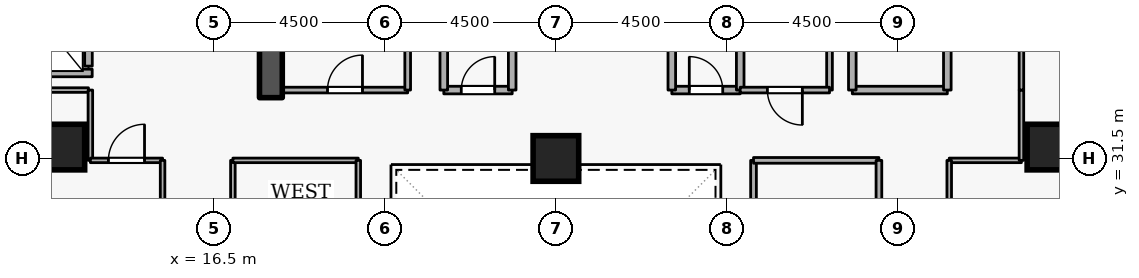
"""IFC4 building model, lengths in metres.
Left out: names, types, materials, properties, quantities, classifications, styles, units other than length and angle.
Written with IfcOpenShell. Run it as: python <this file> out.ifc"""

import sys

from ifc_helpers import new_model, si_unit, direction, frame, frame_2d, origin, origin_2d, place, context, subcontext, project, spatial, rectangle, extrude, element, fill, save


model = new_model("IFC4")
c1 = context("Model", 3, precision=1e-05, world=origin(), true_north=direction((0.0, 1.0)))
c2 = subcontext(c1, "Body", "Model", "MODEL_VIEW")
j1 = project(units=[si_unit("LENGTHUNIT", "METRE"), si_unit("PLANEANGLEUNIT", "RADIAN")], contexts=[c1])
p1 = place(None, origin())
s1 = spatial("IfcSite", under=j1, at=p1, CompositionType="ELEMENT")
p2 = place(p1, origin())
s2 = spatial("IfcBuilding", under=s1, at=p2, CompositionType="ELEMENT")
p3 = place(p2, frame((0.0, 0.0, 87.3)))
s3 = spatial("IfcBuildingStorey", under=s2, at=p3, CompositionType="ELEMENT", Elevation=87.3)
p4 = place(p3, frame((18.0, 33.1, 0.0), z_axis=(0.0, 0.0, 1.0), x_axis=(0.0, 1.0, 0.0)))
e1 = element("IfcWall", 1, at=p4, inside=s3, PredefinedType="SHEAR", context=c2, shape_type="SweptSolid", body=[
    extrude(rectangle(XDim=5.7, YDim=0.6, at=frame_2d((2.85, 0.0))), origin(), (0.0, 0.0, 1.0), 3.6),
])
for number, where, z_axis, x_axis in (
    (2, (12.5, 31.8, 0.0), (0.0, 0.0, 1.0), (1.0, 0.0, 0.0)),
    (3, (38.5, 31.8, 0.0), (0.0, 0.0, 1.0), (1.0, 0.0, 0.0)),
    (4, (25.5, 31.5, 0.0), (0.0, 0.0, 1.0), (1.0, 0.0, 0.0)),
):
    element("IfcColumn", number, at=place(p3, frame(where, z_axis=z_axis, x_axis=x_axis)), inside=s3, PredefinedType="COLUMN", context=c2, shape_type="SweptSolid", body=[
        extrude(rectangle(XDim=1.2, YDim=1.2, at=origin_2d()), origin(), (0.0, 0.0, 1.0), 3.6),
    ])
p5 = place(p3, frame((13.2, 33.93, 0.0), z_axis=(0.0, 0.0, 1.0), x_axis=(0.0, 1.0, 0.0)))
e5 = element("IfcWall", 5, at=p5, inside=s3, PredefinedType="STANDARD", context=c2, shape_type="SweptSolid", body=[
    extrude(rectangle(XDim=1.94, YDim=0.2, at=frame_2d((0.97, 0.0))), origin(), (0.0, 0.0, 1.0), 3.34),
])
p6 = place(p5, frame((0.46, 0.0, 0.0)))
e6 = element("IfcOpeningElement", 6, at=p6, cuts=e5, PredefinedType="OPENING", context=c2, shape_type="SweptSolid", body=[
    extrude(rectangle(XDim=1.02, YDim=2.06, at=frame_2d((0.51, 1.03))), frame((0.0, 0.11, 0.0), z_axis=(0.0, -1.0, 0.0), x_axis=(1.0, 0.0, 0.0)), (0.0, 0.0, 1.0), 0.22),
])
p7 = place(p3, frame((11.002, 33.75, 0.0), z_axis=(0.0, 0.0, 1.0), x_axis=(1.0, 0.0, 0.0)))
e7 = element("IfcWall", 7, at=p7, inside=s3, PredefinedType="STANDARD", context=c2, shape_type="SweptSolid", body=[
    extrude(rectangle(XDim=2.296, YDim=0.2, at=frame_2d((1.148, 0.0))), origin(), (0.0, 0.0, 1.0), 3.34),
])
p8 = place(p3, frame((33.3, 33.3, 0.0), z_axis=(0.0, 0.0, 1.0), x_axis=(1.0, 0.0, 0.0)))
e8 = element("IfcWall", 8, at=p8, inside=s3, PredefinedType="STANDARD", context=c2, shape_type="SweptSolid", body=[
    extrude(rectangle(XDim=2.5, YDim=0.2, at=frame_2d((1.25, 0.0))), origin(), (0.0, 0.0, 1.0), 3.34),
])
p9 = place(p3, frame((35.8, 33.3, 0.0), z_axis=(0.0, 0.0, 1.0), x_axis=(0.0, 1.0, 0.0)))
e9 = element("IfcWall", 9, at=p9, inside=s3, PredefinedType="STANDARD", context=c2, shape_type="SweptSolid", body=[
    extrude(rectangle(XDim=5.7, YDim=0.2, at=frame_2d((2.85, 0.0))), origin(), (0.0, 0.0, 1.0), 3.34),
])
p10 = place(p9, frame((2.275, 0.0, 0.0)))
e10 = element("IfcOpeningElement", 10, at=p10, cuts=e9, PredefinedType="OPENING", context=c2, shape_type="SweptSolid", body=[
    extrude(rectangle(XDim=1.15, YDim=2.1, at=frame_2d((0.575, 1.05))), frame((0.0, 0.11, 0.0), z_axis=(0.0, -1.0, 0.0), x_axis=(1.0, 0.0, 0.0)), (0.0, 0.0, 1.0), 0.22),
])
p11 = place(p3, frame((33.3, 35.6, 0.0), z_axis=(0.0, 0.0, 1.0), x_axis=(0.0, -1.0, 0.0)))
e11 = element("IfcWall", 11, at=p11, inside=s3, PredefinedType="STANDARD", context=c2, shape_type="SweptSolid", body=[
    extrude(rectangle(XDim=2.3, YDim=0.2, at=frame_2d((1.15, 0.0))), origin(), (0.0, 0.0, 1.0), 2.545),
])
p12 = place(p3, frame((22.55, 33.3, 0.0), z_axis=(0.0, 0.0, 1.0), x_axis=(1.0, 0.0, 0.0)))
e12 = element("IfcWall", 12, at=p12, inside=s3, PredefinedType="STANDARD", context=c2, shape_type="SweptSolid", body=[
    extrude(rectangle(XDim=1.8, YDim=0.2, at=frame_2d((0.9, 0.0))), origin(), (0.0, 0.0, 1.0), 3.34),
])
p13 = place(p12, frame((0.46, 0.0, 0.0)))
e13 = element("IfcOpeningElement", 13, at=p13, cuts=e12, PredefinedType="OPENING", context=c2, shape_type="SweptSolid", body=[
    extrude(rectangle(XDim=0.88, YDim=2.04, at=frame_2d((0.44, 1.02))), frame((0.0, 0.11, 0.0), z_axis=(0.0, -1.0, 0.0), x_axis=(1.0, 0.0, 0.0)), (0.0, 0.0, 1.0), 0.22),
])
for number, where, z_axis, x_axis in (
    (14, (24.35, 33.3, 0.0), (0.0, 0.0, 1.0), (0.0, 1.0, 0.0)),
    (15, (22.55, 35.35, 0.0), (0.0, 0.0, 1.0), (0.0, -1.0, 0.0)),
):
    element("IfcWall", number, at=place(p3, frame(where, z_axis=z_axis, x_axis=x_axis)), inside=s3, PredefinedType="STANDARD", context=c2, shape_type="SweptSolid", body=[
        extrude(rectangle(XDim=2.05, YDim=0.2, at=frame_2d((1.025, 0.0))), origin(), (0.0, 0.0, 1.0), 3.34),
    ])
p14 = place(p3, frame((28.55, 33.3, 0.0), z_axis=(0.0, 0.0, 1.0), x_axis=(1.0, 0.0, 0.0)))
e16 = element("IfcWall", 16, at=p14, inside=s3, PredefinedType="STANDARD", context=c2, shape_type="SweptSolid", body=[
    extrude(rectangle(XDim=1.8, YDim=0.2, at=frame_2d((0.9, 0.0))), origin(), (0.0, 0.0, 1.0), 3.34),
])
p15 = place(p14, frame((0.46, 0.0, 0.0)))
e17 = element("IfcOpeningElement", 17, at=p15, cuts=e16, PredefinedType="OPENING", context=c2, shape_type="SweptSolid", body=[
    extrude(rectangle(XDim=0.88, YDim=2.04, at=frame_2d((0.44, 1.02))), frame((0.0, 0.11, 0.0), z_axis=(0.0, -1.0, 0.0), x_axis=(1.0, 0.0, 0.0)), (0.0, 0.0, 1.0), 0.22),
])
for number, where, z_axis, x_axis in (
    (18, (30.35, 33.3, 0.0), (0.0, 0.0, 1.0), (0.0, 1.0, 0.0)),
    (19, (28.55, 35.35, 0.0), (0.0, 0.0, 1.0), (0.0, -1.0, 0.0)),
):
    element("IfcWall", number, at=place(p3, frame(where, z_axis=z_axis, x_axis=x_axis)), inside=s3, PredefinedType="STANDARD", context=c2, shape_type="SweptSolid", body=[
        extrude(rectangle(XDim=2.05, YDim=0.2, at=frame_2d((1.025, 0.0))), origin(), (0.0, 0.0, 1.0), 3.34),
    ])
p16 = place(p3, frame((18.3, 33.3, 0.0), z_axis=(0.0, 0.0, 1.0), x_axis=(1.0, 0.0, 0.0)))
e20 = element("IfcWall", 20, at=p16, inside=s3, PredefinedType="PARTITIONING", context=c2, shape_type="SweptSolid", body=[
    extrude(rectangle(XDim=3.3, YDim=0.15, at=frame_2d((1.65, 0.0))), origin(), (0.0, 0.0, 1.0), 3.34),
])
p17 = place(p16, frame((1.19, 0.0, 0.0)))
e21 = element("IfcOpeningElement", 21, at=p17, cuts=e20, PredefinedType="OPENING", context=c2, shape_type="SweptSolid", body=[
    extrude(rectangle(XDim=0.92, YDim=2.08, at=frame_2d((0.46, 1.04))), frame((0.0, 0.085, 0.0), z_axis=(0.0, -1.0, 0.0), x_axis=(1.0, 0.0, 0.0)), (0.0, 0.0, 1.0), 0.17),
])
p18 = place(p3, frame((21.6, 33.3, 0.0), z_axis=(0.0, 0.0, 1.0), x_axis=(0.0, 1.0, 0.0)))
e22 = element("IfcWall", 22, at=p18, inside=s3, PredefinedType="PARTITIONING", context=c2, shape_type="SweptSolid", body=[
    extrude(rectangle(XDim=2.05, YDim=0.15, at=frame_2d((1.025, 0.0))), origin(), (0.0, 0.0, 1.0), 3.34),
])
p19 = place(p3, frame((32.7, 35.35, 0.0), z_axis=(0.0, 0.0, 1.0), x_axis=(0.0, -1.0, 0.0)))
e23 = element("IfcWall", 23, at=p19, inside=s3, PredefinedType="PARTITIONING", context=c2, shape_type="SweptSolid", body=[
    extrude(rectangle(XDim=2.05, YDim=0.15, at=frame_2d((1.025, 0.0))), origin(), (0.0, 0.0, 1.0), 2.545),
])
p20 = place(p3, frame((32.7, 33.3, 0.0), z_axis=(0.0, 0.0, 1.0), x_axis=(-1.0, 0.0, 0.0)))
e24 = element("IfcWall", 24, at=p20, inside=s3, PredefinedType="PARTITIONING", context=c2, shape_type="SweptSolid", body=[
    extrude(rectangle(XDim=2.35, YDim=0.15, at=frame_2d((1.175, 0.0))), origin(), (0.0, 0.0, 1.0), 3.34),
])
p21 = place(p20, frame((0.715, 0.0, 0.0)))
e25 = element("IfcOpeningElement", 25, at=p21, cuts=e24, PredefinedType="OPENING", context=c2, shape_type="SweptSolid", body=[
    extrude(rectangle(XDim=0.92, YDim=2.08, at=frame_2d((0.46, 1.04))), frame((0.0, 0.085, 0.0), z_axis=(0.0, -1.0, 0.0), x_axis=(1.0, 0.0, 0.0)), (0.0, 0.0, 1.0), 0.17),
])
p22 = place(p3, frame((10.9, 33.3, 0.0), z_axis=(0.0, 0.0, 1.0), x_axis=(1.0, 0.0, 0.0)))
e26 = element("IfcWall", 26, at=p22, inside=s3, PredefinedType="PARTITIONING", context=c2, shape_type="SweptSolid", body=[
    extrude(rectangle(XDim=2.3, YDim=0.12, at=frame_2d((1.15, 0.0))), origin(), (0.0, 0.0, 1.0), 3.34),
])
p23 = place(p3, frame((13.25, 33.3, 0.0), z_axis=(0.0, 0.0, 1.0), x_axis=(0.0, -1.0, 0.0)))
e27 = element("IfcWall", 27, at=p23, inside=s3, PredefinedType="PARTITIONING", context=c2, shape_type="SweptSolid", body=[
    extrude(rectangle(XDim=1.85, YDim=0.12, at=frame_2d((0.925, 0.0))), origin(), (0.0, 0.0, 1.0), 3.34),
])
p24 = place(p3, frame((13.25, 31.45, 0.0), z_axis=(0.0, 0.0, 1.0), x_axis=(1.0, 0.0, 0.0)))
e28 = element("IfcWall", 28, at=p24, inside=s3, PredefinedType="PARTITIONING", context=c2, shape_type="SweptSolid", body=[
    extrude(rectangle(XDim=1.9, YDim=0.12, at=frame_2d((0.95, 0.0))), origin(), (0.0, 0.0, 1.0), 3.34),
])
p25 = place(p24, frame((0.475, 0.0, 0.0)))
e29 = element("IfcOpeningElement", 29, at=p25, cuts=e28, PredefinedType="OPENING", context=c2, shape_type="SweptSolid", body=[
    extrude(rectangle(XDim=0.95, YDim=2.1, at=frame_2d((0.475, 1.05))), frame((0.0, 0.07, 0.0), z_axis=(0.0, -1.0, 0.0), x_axis=(1.0, 0.0, 0.0)), (0.0, 0.0, 1.0), 0.14),
])
p26 = place(p3, frame((15.15, 31.45, 0.0), z_axis=(0.0, 0.0, 1.0), x_axis=(0.0, -1.0, 0.0)))
e30 = element("IfcWall", 30, at=p26, inside=s3, PredefinedType="PARTITIONING", context=c2, shape_type="SweptSolid", body=[
    extrude(rectangle(XDim=1.3, YDim=0.12, at=frame_2d((0.65, 0.0))), origin(), (0.0, 0.0, 1.0), 3.34),
])
p27 = place(p3, frame((35.85, 31.45, 0.0), z_axis=(0.0, 0.0, 1.0), x_axis=(1.0, 0.0, 0.0)))
e31 = element("IfcWall", 31, at=p27, inside=s3, PredefinedType="PARTITIONING", context=c2, shape_type="SweptSolid", body=[
    extrude(rectangle(XDim=1.9, YDim=0.12, at=frame_2d((0.95, 0.0))), origin(), (0.0, 0.0, 1.0), 3.34),
])
p28 = place(p3, frame((37.75, 31.45, 0.0), z_axis=(0.0, 0.0, 1.0), x_axis=(0.0, 1.0, 0.0)))
e32 = element("IfcWall", 32, at=p28, inside=s3, PredefinedType="PARTITIONING", context=c2, shape_type="SweptSolid", body=[
    extrude(rectangle(XDim=1.85, YDim=0.12, at=frame_2d((0.925, 0.0))), origin(), (0.0, 0.0, 1.0), 3.34),
])
p29 = place(p3, frame((37.75, 33.3, 0.0), z_axis=(0.0, 0.0, 1.0), x_axis=(0.0, 1.0, 0.0)))
e33 = element("IfcWall", 33, at=p29, inside=s3, PredefinedType="PARTITIONING", context=c2, shape_type="SweptSolid", body=[
    extrude(rectangle(XDim=9.35, YDim=0.12, at=frame_2d((4.675, 0.0))), origin(), (0.0, 0.0, 1.0), 3.34),
])
p30 = place(p29, frame((4.15, 0.0, 0.0)))
e34 = element("IfcOpeningElement", 34, at=p30, cuts=e33, PredefinedType="OPENING", context=c2, shape_type="SweptSolid", body=[
    extrude(rectangle(XDim=1.05, YDim=2.1, at=frame_2d((0.525, 1.05))), frame((0.0, 0.07, 0.0), z_axis=(0.0, -1.0, 0.0), x_axis=(1.0, 0.0, 0.0)), (0.0, 0.0, 1.0), 0.14),
])
p31 = place(p3, frame((35.85, 30.15, 0.0), z_axis=(0.0, 0.0, 1.0), x_axis=(0.0, 1.0, 0.0)))
e35 = element("IfcWall", 35, at=p31, inside=s3, PredefinedType="PARTITIONING", context=c2, shape_type="SweptSolid", body=[
    extrude(rectangle(XDim=1.3, YDim=0.12, at=frame_2d((0.65, 0.0))), origin(), (0.0, 0.0, 1.0), 3.34),
])
p32 = place(p3, frame((30.7, 22.55, 0.0), z_axis=(0.0, 0.0, 1.0), x_axis=(0.0, 1.0, 0.0)))
e36 = element("IfcWall", 36, at=p32, inside=s3, PredefinedType="PARTITIONING", context=c2, shape_type="SweptSolid", body=[
    extrude(rectangle(XDim=8.9, YDim=0.15, at=frame_2d((4.45, 0.0))), origin(), (0.0, 0.0, 1.0), 3.34),
])
p33 = place(p3, frame((30.7, 31.45, 0.0), z_axis=(0.0, 0.0, 1.0), x_axis=(1.0, 0.0, 0.0)))
e37 = element("IfcWall", 37, at=p33, inside=s3, PredefinedType="PARTITIONING", context=c2, shape_type="SweptSolid", body=[
    extrude(rectangle(XDim=3.3, YDim=0.15, at=frame_2d((1.65, 0.0))), origin(), (0.0, 0.0, 1.0), 3.34),
])
p34 = place(p3, frame((34.0, 31.45, 0.0), z_axis=(0.0, 0.0, 1.0), x_axis=(0.0, -1.0, 0.0)))
e38 = element("IfcWall", 38, at=p34, inside=s3, PredefinedType="PARTITIONING", context=c2, shape_type="SweptSolid", body=[
    extrude(rectangle(XDim=8.9, YDim=0.15, at=frame_2d((4.45, 0.0))), origin(), (0.0, 0.0, 1.0), 3.34),
])
p35 = place(p34, frame((3.8, 0.0, 0.0)))
e39 = element("IfcOpeningElement", 39, at=p35, cuts=e38, PredefinedType="OPENING", context=c2, shape_type="SweptSolid", body=[
    extrude(rectangle(XDim=1.3, YDim=2.12, at=frame_2d((0.65, 1.06))), frame((0.0, 0.085, 0.0), z_axis=(0.0, -1.0, 0.0), x_axis=(1.0, 0.0, 0.0)), (0.0, 0.0, 1.0), 0.17),
])
p36 = place(p3, frame((17.0, 22.55, 0.0), z_axis=(0.0, 0.0, 1.0), x_axis=(0.0, 1.0, 0.0)))
e40 = element("IfcWall", 40, at=p36, inside=s3, PredefinedType="PARTITIONING", context=c2, shape_type="SweptSolid", body=[
    extrude(rectangle(XDim=8.9, YDim=0.12, at=frame_2d((4.45, 0.0))), origin(), (0.0, 0.0, 1.0), 3.34),
])
p37 = place(p36, frame((3.975, 0.0, 0.0)))
e41 = element("IfcOpeningElement", 41, at=p37, cuts=e40, PredefinedType="OPENING", context=c2, shape_type="SweptSolid", body=[
    extrude(rectangle(XDim=0.95, YDim=2.1, at=frame_2d((0.475, 1.05))), frame((0.0, 0.07, 0.0), z_axis=(0.0, -1.0, 0.0), x_axis=(1.0, 0.0, 0.0)), (0.0, 0.0, 1.0), 0.14),
])
p38 = place(p3, frame((17.0, 31.45, 0.0), z_axis=(0.0, 0.0, 1.0), x_axis=(1.0, 0.0, 0.0)))
e42 = element("IfcWall", 42, at=p38, inside=s3, PredefinedType="PARTITIONING", context=c2, shape_type="SweptSolid", body=[
    extrude(rectangle(XDim=3.3, YDim=0.12, at=frame_2d((1.65, 0.0))), origin(), (0.0, 0.0, 1.0), 3.34),
])
p39 = place(p3, frame((20.3, 31.45, 0.0), z_axis=(0.0, 0.0, 1.0), x_axis=(0.0, -1.0, 0.0)))
e43 = element("IfcWall", 43, at=p39, inside=s3, PredefinedType="PARTITIONING", context=c2, shape_type="SweptSolid", body=[
    extrude(rectangle(XDim=8.9, YDim=0.12, at=frame_2d((4.45, 0.0))), origin(), (0.0, 0.0, 1.0), 3.34),
])
p40 = place(p13, origin())
e44 = element("IfcDoor", 44, at=p40, inside=s3, OperationType="SINGLE_SWING_RIGHT", PredefinedType="DOOR", context=c2, shape_type="SweptSolid", body=[
    extrude(rectangle(XDim=0.88, YDim=2.04, at=frame_2d((0.44, 1.02))), frame((0.0, 0.025, 0.0), z_axis=(0.0, -1.0, 0.0), x_axis=(1.0, 0.0, 0.0)), (0.0, 0.0, 1.0), 0.05),
])
fill(e13, e44)
p41 = place(p15, origin())
e45 = element("IfcDoor", 45, at=p41, inside=s3, OperationType="SINGLE_SWING_LEFT", PredefinedType="DOOR", context=c2, shape_type="SweptSolid", body=[
    extrude(rectangle(XDim=0.88, YDim=2.04, at=frame_2d((0.44, 1.02))), frame((0.0, 0.025, 0.0), z_axis=(0.0, -1.0, 0.0), x_axis=(1.0, 0.0, 0.0)), (0.0, 0.0, 1.0), 0.05),
])
fill(e17, e45)
p42 = place(p17, origin())
e46 = element("IfcDoor", 46, at=p42, inside=s3, OperationType="SINGLE_SWING_RIGHT", PredefinedType="DOOR", context=c2, shape_type="SweptSolid", body=[
    extrude(rectangle(XDim=0.92, YDim=2.08, at=frame_2d((0.46, 1.04))), frame((0.0, 0.025, 0.0), z_axis=(0.0, -1.0, 0.0), x_axis=(1.0, 0.0, 0.0)), (0.0, 0.0, 1.0), 0.05),
])
fill(e21, e46)
p43 = place(p21, origin())
e47 = element("IfcDoor", 47, at=p43, inside=s3, OperationType="SINGLE_SWING_LEFT", PredefinedType="DOOR", context=c2, shape_type="SweptSolid", body=[
    extrude(rectangle(XDim=0.92, YDim=2.08, at=frame_2d((0.46, 1.04))), frame((0.0, 0.025, 0.0), z_axis=(0.0, -1.0, 0.0), x_axis=(1.0, 0.0, 0.0)), (0.0, 0.0, 1.0), 0.05),
])
fill(e25, e47)
p44 = place(p25, origin())
e48 = element("IfcDoor", 48, at=p44, inside=s3, OperationType="SINGLE_SWING_RIGHT", PredefinedType="DOOR", context=c2, shape_type="SweptSolid", body=[
    extrude(rectangle(XDim=0.95, YDim=2.1, at=frame_2d((0.475, 1.05))), frame((0.0, 0.025, 0.0), z_axis=(0.0, -1.0, 0.0), x_axis=(1.0, 0.0, 0.0)), (0.0, 0.0, 1.0), 0.05),
])
fill(e29, e48)
save(model, sys.argv[1])
